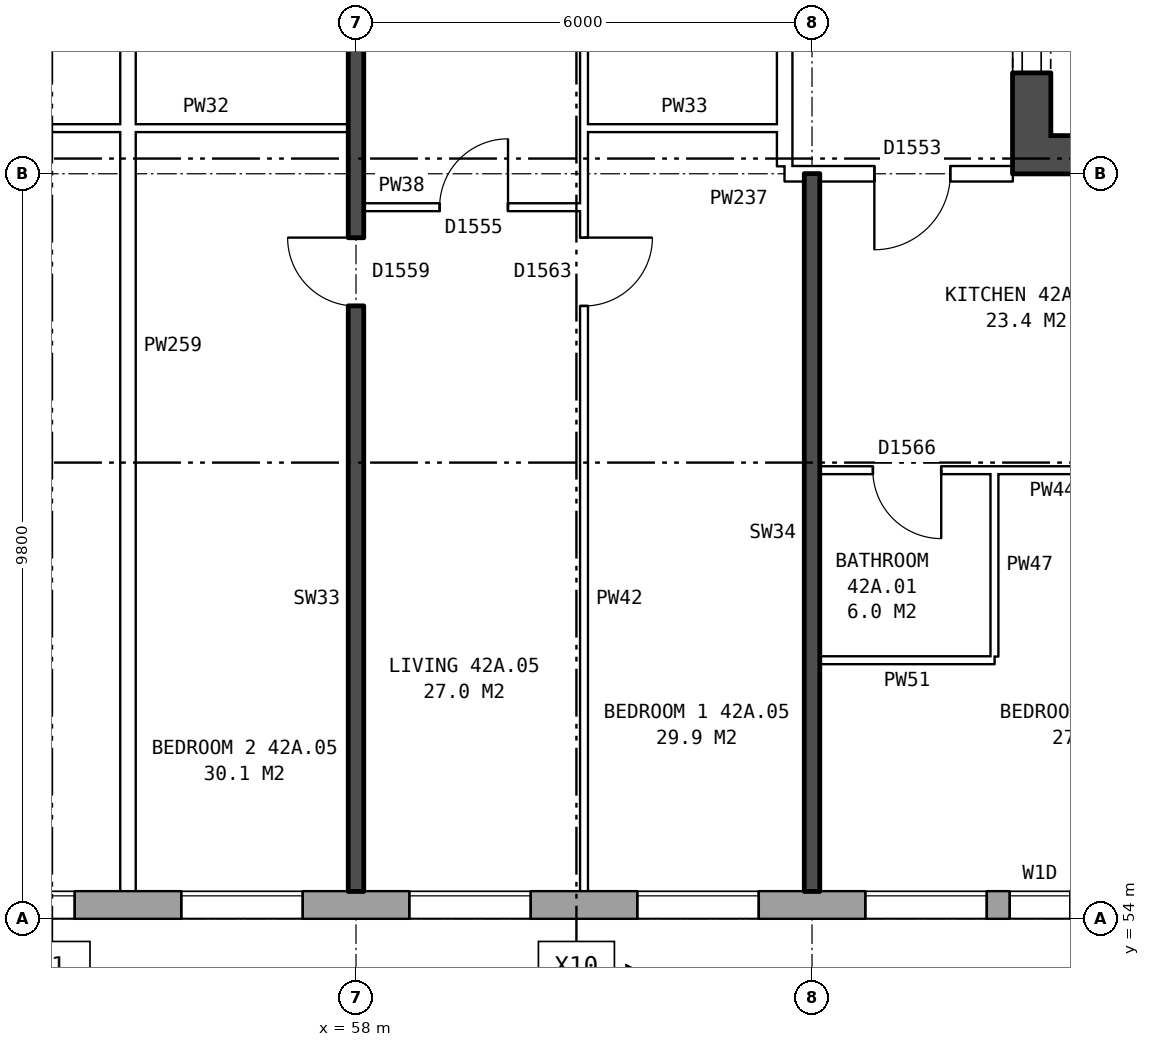
"""IFC4 building model, lengths in metres.
Left out: names, types, materials, properties, quantities, classifications, styles, units other than length and angle.
Written with IfcOpenShell. Run it as: python <this file> out.ifc"""

import sys

from ifc_helpers import new_model, si_unit, direction, frame, frame_2d, origin, place, context, subcontext, project, spatial, rectangle, extrude, element, fill, save


model = new_model("IFC4")
c1 = context("Model", 3, precision=1e-05, world=origin(), true_north=direction((0.0, 1.0)))
c2 = subcontext(c1, "Body", "Model", "MODEL_VIEW")
j1 = project(units=[si_unit("LENGTHUNIT", "METRE"), si_unit("PLANEANGLEUNIT", "RADIAN")], contexts=[c1])
p1 = place(None, origin())
s1 = spatial("IfcSite", under=j1, at=p1, CompositionType="ELEMENT")
p2 = place(p1, origin())
s2 = spatial("IfcBuilding", under=s1, at=p2, CompositionType="ELEMENT")
p3 = place(p2, frame((0.0, 0.0, 151.6)))
s3 = spatial("IfcBuildingStorey", under=s2, at=p3, CompositionType="ELEMENT", Elevation=151.6)
p4 = place(p3, frame((31.575, 54.18, 0.0), z_axis=(0.0, 0.0, 1.0), x_axis=(1.0, 0.0, 0.0)))
e1 = element("IfcWall", 1, at=p4, inside=s3, PredefinedType="STANDARD", context=c2, shape_type="SweptSolid", body=[
    extrude(rectangle(XDim=41.351, YDim=0.36, at=frame_2d((20.675, 0.0))), origin(), (0.0, 0.0, 1.0), 2.85),
])
p5 = place(p4, frame((4.625, 0.0, 0.8)))
e2 = element("IfcOpeningElement", 2, at=p5, cuts=e1, PredefinedType="OPENING", context=c2, shape_type="SweptSolid", body=[
    extrude(rectangle(XDim=1.2, YDim=1.2, at=frame_2d((0.6, 0.6))), frame((0.0, 0.19, 0.0), z_axis=(0.0, -1.0, 0.0), x_axis=(1.0, 0.0, 0.0)), (0.0, 0.0, 1.0), 0.38),
])
p6 = place(p4, frame((6.125, 0.0, 0.8)))
e3 = element("IfcOpeningElement", 3, at=p6, cuts=e1, PredefinedType="OPENING", context=c2, shape_type="SweptSolid", body=[
    extrude(rectangle(XDim=1.6, YDim=1.8, at=frame_2d((0.8, 0.9))), frame((0.0, 0.19, 0.0), z_axis=(0.0, -1.0, 0.0), x_axis=(1.0, 0.0, 0.0)), (0.0, 0.0, 1.0), 0.38),
])
p7 = place(p4, frame((9.125, 0.0, 0.8)))
e4 = element("IfcOpeningElement", 4, at=p7, cuts=e1, PredefinedType="OPENING", context=c2, shape_type="SweptSolid", body=[
    extrude(rectangle(XDim=1.6, YDim=1.8, at=frame_2d((0.8, 0.9))), frame((0.0, 0.19, 0.0), z_axis=(0.0, -1.0, 0.0), x_axis=(1.0, 0.0, 0.0)), (0.0, 0.0, 1.0), 0.38),
])
p8 = place(p4, frame((12.125, 0.0, 0.8)))
e5 = element("IfcOpeningElement", 5, at=p8, cuts=e1, PredefinedType="OPENING", context=c2, shape_type="SweptSolid", body=[
    extrude(rectangle(XDim=1.6, YDim=1.8, at=frame_2d((0.8, 0.9))), frame((0.0, 0.19, 0.0), z_axis=(0.0, -1.0, 0.0), x_axis=(1.0, 0.0, 0.0)), (0.0, 0.0, 1.0), 0.38),
])
p9 = place(p4, frame((15.125, 0.0, 0.8)))
e6 = element("IfcOpeningElement", 6, at=p9, cuts=e1, PredefinedType="OPENING", context=c2, shape_type="SweptSolid", body=[
    extrude(rectangle(XDim=1.6, YDim=1.8, at=frame_2d((0.8, 0.9))), frame((0.0, 0.19, 0.0), z_axis=(0.0, -1.0, 0.0), x_axis=(1.0, 0.0, 0.0)), (0.0, 0.0, 1.0), 0.38),
])
p10 = place(p4, frame((18.125, 0.0, 0.8)))
e7 = element("IfcOpeningElement", 7, at=p10, cuts=e1, PredefinedType="OPENING", context=c2, shape_type="SweptSolid", body=[
    extrude(rectangle(XDim=1.6, YDim=1.8, at=frame_2d((0.8, 0.9))), frame((0.0, 0.19, 0.0), z_axis=(0.0, -1.0, 0.0), x_axis=(1.0, 0.0, 0.0)), (0.0, 0.0, 1.0), 0.38),
])
p11 = place(p4, frame((21.125, 0.0, 0.8)))
e8 = element("IfcOpeningElement", 8, at=p11, cuts=e1, PredefinedType="OPENING", context=c2, shape_type="SweptSolid", body=[
    extrude(rectangle(XDim=1.6, YDim=1.8, at=frame_2d((0.8, 0.9))), frame((0.0, 0.19, 0.0), z_axis=(0.0, -1.0, 0.0), x_axis=(1.0, 0.0, 0.0)), (0.0, 0.0, 1.0), 0.38),
])
p12 = place(p4, frame((24.125, 0.0, 0.8)))
e9 = element("IfcOpeningElement", 9, at=p12, cuts=e1, PredefinedType="OPENING", context=c2, shape_type="SweptSolid", body=[
    extrude(rectangle(XDim=1.6, YDim=1.8, at=frame_2d((0.8, 0.9))), frame((0.0, 0.19, 0.0), z_axis=(0.0, -1.0, 0.0), x_axis=(1.0, 0.0, 0.0)), (0.0, 0.0, 1.0), 0.38),
])
p13 = place(p4, frame((27.125, 0.0, 0.8)))
e10 = element("IfcOpeningElement", 10, at=p13, cuts=e1, PredefinedType="OPENING", context=c2, shape_type="SweptSolid", body=[
    extrude(rectangle(XDim=1.6, YDim=1.8, at=frame_2d((0.8, 0.9))), frame((0.0, 0.19, 0.0), z_axis=(0.0, -1.0, 0.0), x_axis=(1.0, 0.0, 0.0)), (0.0, 0.0, 1.0), 0.38),
])
p14 = place(p4, frame((30.125, 0.0, 0.8)))
e11 = element("IfcOpeningElement", 11, at=p14, cuts=e1, PredefinedType="OPENING", context=c2, shape_type="SweptSolid", body=[
    extrude(rectangle(XDim=1.6, YDim=1.8, at=frame_2d((0.8, 0.9))), frame((0.0, 0.19, 0.0), z_axis=(0.0, -1.0, 0.0), x_axis=(1.0, 0.0, 0.0)), (0.0, 0.0, 1.0), 0.38),
])
p15 = place(p4, frame((33.125, 0.0, 0.8)))
e12 = element("IfcOpeningElement", 12, at=p15, cuts=e1, PredefinedType="OPENING", context=c2, shape_type="SweptSolid", body=[
    extrude(rectangle(XDim=1.6, YDim=1.8, at=frame_2d((0.8, 0.9))), frame((0.0, 0.19, 0.0), z_axis=(0.0, -1.0, 0.0), x_axis=(1.0, 0.0, 0.0)), (0.0, 0.0, 1.0), 0.38),
])
p16 = place(p4, frame((35.025, 0.0, 0.8)))
e13 = element("IfcOpeningElement", 13, at=p16, cuts=e1, PredefinedType="OPENING", context=c2, shape_type="SweptSolid", body=[
    extrude(rectangle(XDim=0.8, YDim=1.8, at=frame_2d((0.4, 0.9))), frame((0.0, 0.19, 0.0), z_axis=(0.0, -1.0, 0.0), x_axis=(1.0, 0.0, 0.0)), (0.0, 0.0, 1.0), 0.38),
])
p17 = place(p4, frame((38.625, 0.0, 1.5)))
e14 = element("IfcOpeningElement", 14, at=p17, cuts=e1, PredefinedType="OPENING", context=c2, shape_type="SweptSolid", body=[
    extrude(rectangle(XDim=0.6, YDim=0.9, at=frame_2d((0.3, 0.45))), frame((0.0, 0.19, 0.0), z_axis=(0.0, -1.0, 0.0), x_axis=(1.0, 0.0, 0.0)), (0.0, 0.0, 1.0), 0.38),
])
p18 = place(p4, frame((36.125, 0.0, 0.8)))
e15 = element("IfcOpeningElement", 15, at=p18, cuts=e1, PredefinedType="OPENING", context=c2, shape_type="SweptSolid", body=[
    extrude(rectangle(XDim=1.0, YDim=0.9, at=frame_2d((0.5, 0.45))), frame((0.0, 0.19, 0.0), z_axis=(0.0, -1.0, 0.0), x_axis=(1.0, 0.0, 0.0)), (0.0, 0.0, 1.0), 0.38),
])
p19 = place(p4, frame((39.525, 0.0, 0.8)))
e16 = element("IfcOpeningElement", 16, at=p19, cuts=e1, PredefinedType="OPENING", context=c2, shape_type="SweptSolid", body=[
    extrude(rectangle(XDim=1.4, YDim=1.8, at=frame_2d((0.7, 0.9))), frame((0.0, 0.19, 0.0), z_axis=(0.0, -1.0, 0.0), x_axis=(1.0, 0.0, 0.0)), (0.0, 0.0, 1.0), 0.38),
])
p20 = place(p3, frame((66.89, 63.8, 0.0), z_axis=(0.0, 0.0, 1.0), x_axis=(0.0, 1.0, 0.0)))
e17 = element("IfcWall", 17, at=p20, inside=s3, PredefinedType="SHEAR", context=c2, shape_type="SweptSolid", body=[
    extrude(rectangle(XDim=12.4, YDim=0.5, at=frame_2d((6.2, 0.0))), origin(), (0.0, 0.0, 1.0), 2.85),
])
p21 = place(p20, frame((1.325, 0.0, 0.0)))
e18 = element("IfcOpeningElement", 18, at=p21, cuts=e17, PredefinedType="OPENING", context=c2, shape_type="SweptSolid", body=[
    extrude(rectangle(XDim=1.1, YDim=2.1, at=frame_2d((0.55, 1.05))), frame((0.0, 0.26, 0.0), z_axis=(0.0, -1.0, 0.0), x_axis=(1.0, 0.0, 0.0)), (0.0, 0.0, 1.0), 0.52),
])
p22 = place(p20, frame((3.6, 0.0, 0.0)))
e19 = element("IfcOpeningElement", 19, at=p22, cuts=e17, PredefinedType="OPENING", context=c2, shape_type="SweptSolid", body=[
    extrude(rectangle(XDim=1.1, YDim=2.1, at=frame_2d((0.55, 1.05))), frame((0.0, 0.26, 0.0), z_axis=(0.0, -1.0, 0.0), x_axis=(1.0, 0.0, 0.0)), (0.0, 0.0, 1.0), 0.52),
])
p23 = place(p20, frame((5.8, 0.0, 0.0)))
e20 = element("IfcOpeningElement", 20, at=p23, cuts=e17, PredefinedType="OPENING", context=c2, shape_type="SweptSolid", body=[
    extrude(rectangle(XDim=1.1, YDim=2.1, at=frame_2d((0.55, 1.05))), frame((0.0, 0.26, 0.0), z_axis=(0.0, -1.0, 0.0), x_axis=(1.0, 0.0, 0.0)), (0.0, 0.0, 1.0), 0.52),
])
p24 = place(p20, frame((8.0, 0.0, 0.0)))
e21 = element("IfcOpeningElement", 21, at=p24, cuts=e17, PredefinedType="OPENING", context=c2, shape_type="SweptSolid", body=[
    extrude(rectangle(XDim=1.1, YDim=2.1, at=frame_2d((0.55, 1.05))), frame((0.0, 0.26, 0.0), z_axis=(0.0, -1.0, 0.0), x_axis=(1.0, 0.0, 0.0)), (0.0, 0.0, 1.0), 0.52),
])
p25 = place(p20, frame((9.9, 0.0, 0.0)))
e22 = element("IfcOpeningElement", 22, at=p25, cuts=e17, PredefinedType="OPENING", context=c2, shape_type="SweptSolid", body=[
    extrude(rectangle(XDim=1.1, YDim=2.1, at=frame_2d((0.55, 1.05))), frame((0.0, 0.26, 0.0), z_axis=(0.0, -1.0, 0.0), x_axis=(1.0, 0.0, 0.0)), (0.0, 0.0, 1.0), 0.52),
])
p26 = place(p3, frame((67.14, 64.05, 0.0), z_axis=(0.0, 0.0, 1.0), x_axis=(1.0, 0.0, 0.0)))
e23 = element("IfcWall", 23, at=p26, inside=s3, PredefinedType="SHEAR", context=c2, shape_type="SweptSolid", body=[
    extrude(rectangle(XDim=8.0, YDim=0.5, at=frame_2d((4.0, 0.0))), origin(), (0.0, 0.0, 1.0), 2.85),
])
p27 = place(p3, frame((63.64, 63.9, 0.0), z_axis=(0.0, 0.0, 1.0), x_axis=(0.0, 1.0, 0.0)))
e24 = element("IfcWall", 24, at=p27, inside=s3, PredefinedType="PARTITIONING", context=c2, shape_type="SweptSolid", body=[
    extrude(rectangle(XDim=12.2, YDim=0.2, at=frame_2d((6.1, 0.0))), origin(), (0.0, 0.0, 1.0), 2.85),
])
p28 = place(p27, frame((5.1, 0.0, 0.0)))
e25 = element("IfcOpeningElement", 25, at=p28, cuts=e24, PredefinedType="OPENING", context=c2, shape_type="SweptSolid", body=[
    extrude(rectangle(XDim=2.0, YDim=2.1, at=frame_2d((1.0, 1.05))), frame((0.0, 0.11, 0.0), z_axis=(0.0, -1.0, 0.0), x_axis=(1.0, 0.0, 0.0)), (0.0, 0.0, 1.0), 0.22),
])
p29 = place(p3, frame((64.1, 57.4, 0.0), z_axis=(0.0, 0.0, 1.0), x_axis=(1.0, 0.0, 0.0)))
e26 = element("IfcWall", 26, at=p29, inside=s3, PredefinedType="PARTITIONING", context=c2, shape_type="SweptSolid", body=[
    extrude(rectangle(XDim=2.3, YDim=0.1, at=frame_2d((1.15, 0.0))), origin(), (0.0, 0.0, 1.0), 2.85),
])
p30 = place(p3, frame((64.1, 59.9, 0.0), z_axis=(0.0, 0.0, 1.0), x_axis=(1.0, 0.0, 0.0)))
e27 = element("IfcWall", 27, at=p30, inside=s3, PredefinedType="PARTITIONING", context=c2, shape_type="SweptSolid", body=[
    extrude(rectangle(XDim=5.8, YDim=0.1, at=frame_2d((2.9, 0.0))), origin(), (0.0, 0.0, 1.0), 2.85),
])
p31 = place(p30, frame((3.6, 0.0, 0.0)))
e28 = element("IfcOpeningElement", 28, at=p31, cuts=e27, PredefinedType="OPENING", context=c2, shape_type="SweptSolid", body=[
    extrude(rectangle(XDim=0.9, YDim=2.1, at=frame_2d((0.45, 1.05))), frame((0.0, 0.06, 0.0), z_axis=(0.0, -1.0, 0.0), x_axis=(1.0, 0.0, 0.0)), (0.0, 0.0, 1.0), 0.12),
])
p32 = place(p30, frame((0.7, 0.0, 0.0)))
e29 = element("IfcOpeningElement", 29, at=p32, cuts=e27, PredefinedType="OPENING", context=c2, shape_type="SweptSolid", body=[
    extrude(rectangle(XDim=0.9, YDim=2.1, at=frame_2d((0.45, 1.05))), frame((0.0, 0.06, 0.0), z_axis=(0.0, -1.0, 0.0), x_axis=(1.0, 0.0, 0.0)), (0.0, 0.0, 1.0), 0.12),
])
p33 = place(p3, frame((58.1, 63.36, 0.0), z_axis=(0.0, 0.0, 1.0), x_axis=(1.0, 0.0, 0.0)))
e30 = element("IfcWall", 30, at=p33, inside=s3, PredefinedType="PARTITIONING", context=c2, shape_type="SweptSolid", body=[
    extrude(rectangle(XDim=2.9, YDim=0.1, at=frame_2d((1.45, 0.0))), origin(), (0.0, 0.0, 1.0), 2.85),
])
p34 = place(p33, frame((1.0, 0.0, 0.0)))
e31 = element("IfcOpeningElement", 31, at=p34, cuts=e30, PredefinedType="OPENING", context=c2, shape_type="SweptSolid", body=[
    extrude(rectangle(XDim=0.9, YDim=2.1, at=frame_2d((0.45, 1.05))), frame((0.0, 0.06, 0.0), z_axis=(0.0, -1.0, 0.0), x_axis=(1.0, 0.0, 0.0)), (0.0, 0.0, 1.0), 0.12),
])
p35 = place(p3, frame((63.64, 63.8, 0.0), z_axis=(0.0, 0.0, 1.0), x_axis=(1.0, 0.0, 0.0)))
e32 = element("IfcWall", 32, at=p35, inside=s3, PredefinedType="PARTITIONING", context=c2, shape_type="SweptSolid", body=[
    extrude(rectangle(XDim=3.0, YDim=0.2, at=frame_2d((1.5, 0.0))), origin(), (0.0, 0.0, 1.0), 2.85),
])
p36 = place(p35, frame((1.18, 0.0, 0.0)))
e33 = element("IfcOpeningElement", 33, at=p36, cuts=e32, PredefinedType="OPENING", context=c2, shape_type="SweptSolid", body=[
    extrude(rectangle(XDim=1.0, YDim=2.1, at=frame_2d((0.5, 1.05))), frame((0.0, 0.11, 0.0), z_axis=(0.0, -1.0, 0.0), x_axis=(1.0, 0.0, 0.0)), (0.0, 0.0, 1.0), 0.22),
])
p37 = place(p3, frame((52.1, 64.4, 0.0), z_axis=(0.0, 0.0, 1.0), x_axis=(1.0, 0.0, 0.0)))
e34 = element("IfcWall", 34, at=p37, inside=s3, PredefinedType="PARTITIONING", context=c2, shape_type="SweptSolid", body=[
    extrude(rectangle(XDim=5.8, YDim=0.1, at=frame_2d((2.9, 0.0))), origin(), (0.0, 0.0, 1.0), 2.85),
])
p38 = place(p3, frame((61.0, 64.4, 0.0), z_axis=(0.0, 0.0, 1.0), x_axis=(1.0, 0.0, 0.0)))
e35 = element("IfcWall", 35, at=p38, inside=s3, PredefinedType="PARTITIONING", context=c2, shape_type="SweptSolid", body=[
    extrude(rectangle(XDim=2.64, YDim=0.1, at=frame_2d((1.32, 0.0))), origin(), (0.0, 0.0, 1.0), 2.85),
])
p39 = place(p3, frame((55.0, 54.36, 0.0), z_axis=(0.0, 0.0, 1.0), x_axis=(0.0, 1.0, 0.0)))
e36 = element("IfcWall", 36, at=p39, inside=s3, PredefinedType="PARTITIONING", context=c2, shape_type="SweptSolid", body=[
    extrude(rectangle(XDim=14.34, YDim=0.2, at=frame_2d((7.17, 0.0))), origin(), (0.0, 0.0, 1.0), 2.85),
])
p40 = place(p3, frame((58.0, 54.36, 0.0), z_axis=(0.0, 0.0, 1.0), x_axis=(0.0, 1.0, 0.0)))
e37 = element("IfcWall", 37, at=p40, inside=s3, PredefinedType="SOLIDWALL", context=c2, shape_type="SweptSolid", body=[
    extrude(rectangle(XDim=14.44, YDim=0.2, at=frame_2d((7.22, 0.0))), origin(), (0.0, 0.0, 1.0), 2.85),
])
p41 = place(p40, frame((7.7, 0.0, 0.0)))
e38 = element("IfcOpeningElement", 38, at=p41, cuts=e37, PredefinedType="OPENING", context=c2, shape_type="SweptSolid", body=[
    extrude(rectangle(XDim=0.9, YDim=2.1, at=frame_2d((0.45, 1.05))), frame((0.0, 0.11, 0.0), z_axis=(0.0, -1.0, 0.0), x_axis=(1.0, 0.0, 0.0)), (0.0, 0.0, 1.0), 0.22),
])
p42 = place(p40, frame((13.14, 0.0, 0.0)))
e39 = element("IfcOpeningElement", 39, at=p42, cuts=e37, PredefinedType="OPENING", context=c2, shape_type="SweptSolid", body=[
    extrude(rectangle(XDim=0.9, YDim=2.1, at=frame_2d((0.45, 1.05))), frame((0.0, 0.11, 0.0), z_axis=(0.0, -1.0, 0.0), x_axis=(1.0, 0.0, 0.0)), (0.0, 0.0, 1.0), 0.22),
])
p43 = place(p3, frame((61.0, 54.36, 0.0), z_axis=(0.0, 0.0, 1.0), x_axis=(0.0, 1.0, 0.0)))
e40 = element("IfcWall", 40, at=p43, inside=s3, PredefinedType="PARTITIONING", context=c2, shape_type="SweptSolid", body=[
    extrude(rectangle(XDim=14.34, YDim=0.1, at=frame_2d((7.17, 0.0))), origin(), (0.0, 0.0, 1.0), 2.85),
])
p44 = place(p43, frame((7.7, 0.0, 0.0)))
e41 = element("IfcOpeningElement", 41, at=p44, cuts=e40, PredefinedType="OPENING", context=c2, shape_type="SweptSolid", body=[
    extrude(rectangle(XDim=0.9, YDim=2.1, at=frame_2d((0.45, 1.05))), frame((0.0, 0.06, 0.0), z_axis=(0.0, -1.0, 0.0), x_axis=(1.0, 0.0, 0.0)), (0.0, 0.0, 1.0), 0.12),
])
p45 = place(p43, frame((13.04, 0.0, 0.0)))
e42 = element("IfcOpeningElement", 42, at=p45, cuts=e40, PredefinedType="OPENING", context=c2, shape_type="SweptSolid", body=[
    extrude(rectangle(XDim=0.9, YDim=2.1, at=frame_2d((0.45, 1.05))), frame((0.0, 0.06, 0.0), z_axis=(0.0, -1.0, 0.0), x_axis=(1.0, 0.0, 0.0)), (0.0, 0.0, 1.0), 0.12),
])
p46 = place(p3, frame((64.0, 54.36, 0.0), z_axis=(0.0, 0.0, 1.0), x_axis=(0.0, 1.0, 0.0)))
e43 = element("IfcWall", 43, at=p46, inside=s3, PredefinedType="SOLIDWALL", context=c2, shape_type="SweptSolid", body=[
    extrude(rectangle(XDim=9.44, YDim=0.2, at=frame_2d((4.72, 0.0))), origin(), (0.0, 0.0, 1.0), 2.85),
])
p47 = place(p3, frame((66.4, 57.45, 0.0), z_axis=(0.0, 0.0, 1.0), x_axis=(0.0, 1.0, 0.0)))
e44 = element("IfcWall", 44, at=p47, inside=s3, PredefinedType="PARTITIONING", context=c2, shape_type="SweptSolid", body=[
    extrude(rectangle(XDim=2.4, YDim=0.1, at=frame_2d((1.2, 0.0))), origin(), (0.0, 0.0, 1.0), 2.85),
])
p48 = place(p11, origin())
e45 = element("IfcWindow", 45, at=p48, inside=s3, PartitioningType="SINGLE_PANEL", PredefinedType="WINDOW", context=c2, shape_type="SweptSolid", body=[
    extrude(rectangle(XDim=1.6, YDim=1.8, at=frame_2d((0.8, 0.9))), frame((0.0, 0.15, 0.0), z_axis=(0.0, -1.0, 0.0), x_axis=(1.0, 0.0, 0.0)), (0.0, 0.0, 1.0), 0.06),
])
fill(e8, e45)
p49 = place(p12, origin())
e46 = element("IfcWindow", 46, at=p49, inside=s3, PartitioningType="SINGLE_PANEL", PredefinedType="WINDOW", context=c2, shape_type="SweptSolid", body=[
    extrude(rectangle(XDim=1.6, YDim=1.8, at=frame_2d((0.8, 0.9))), frame((0.0, 0.15, 0.0), z_axis=(0.0, -1.0, 0.0), x_axis=(1.0, 0.0, 0.0)), (0.0, 0.0, 1.0), 0.06),
])
fill(e9, e46)
p50 = place(p13, origin())
e47 = element("IfcWindow", 47, at=p50, inside=s3, PartitioningType="SINGLE_PANEL", PredefinedType="WINDOW", context=c2, shape_type="SweptSolid", body=[
    extrude(rectangle(XDim=1.6, YDim=1.8, at=frame_2d((0.8, 0.9))), frame((0.0, 0.15, 0.0), z_axis=(0.0, -1.0, 0.0), x_axis=(1.0, 0.0, 0.0)), (0.0, 0.0, 1.0), 0.06),
])
fill(e10, e47)
p51 = place(p14, origin())
e48 = element("IfcWindow", 48, at=p51, inside=s3, PartitioningType="SINGLE_PANEL", PredefinedType="WINDOW", context=c2, shape_type="SweptSolid", body=[
    extrude(rectangle(XDim=1.6, YDim=1.8, at=frame_2d((0.8, 0.9))), frame((0.0, 0.15, 0.0), z_axis=(0.0, -1.0, 0.0), x_axis=(1.0, 0.0, 0.0)), (0.0, 0.0, 1.0), 0.06),
])
fill(e11, e48)
p52 = place(p15, origin())
e49 = element("IfcWindow", 49, at=p52, inside=s3, PartitioningType="SINGLE_PANEL", PredefinedType="WINDOW", context=c2, shape_type="SweptSolid", body=[
    extrude(rectangle(XDim=1.6, YDim=1.8, at=frame_2d((0.8, 0.9))), frame((0.0, 0.15, 0.0), z_axis=(0.0, -1.0, 0.0), x_axis=(1.0, 0.0, 0.0)), (0.0, 0.0, 1.0), 0.06),
])
fill(e12, e49)
p53 = place(p16, origin())
e50 = element("IfcWindow", 50, at=p53, inside=s3, PartitioningType="SINGLE_PANEL", PredefinedType="WINDOW", context=c2, shape_type="SweptSolid", body=[
    extrude(rectangle(XDim=0.8, YDim=1.8, at=frame_2d((0.4, 0.9))), frame((0.0, 0.15, 0.0), z_axis=(0.0, -1.0, 0.0), x_axis=(1.0, 0.0, 0.0)), (0.0, 0.0, 1.0), 0.06),
])
fill(e13, e50)
p54 = place(p21, origin())
e51 = element("IfcDoor", 51, at=p54, inside=s3, OperationType="DOUBLE_DOOR_SLIDING", PredefinedType="DOOR", context=c2, shape_type="SweptSolid", body=[
    extrude(rectangle(XDim=1.1, YDim=2.1, at=frame_2d((0.55, 1.05))), frame((0.0, -0.185, 0.0), z_axis=(0.0, -1.0, 0.0), x_axis=(1.0, 0.0, 0.0)), (0.0, 0.0, 1.0), 0.05),
])
fill(e18, e51)
p55 = place(p36, frame((1.0, 0.0, 0.0), z_axis=(0.0, 0.0, 1.0), x_axis=(-1.0, 0.0, 0.0)))
e52 = element("IfcDoor", 52, at=p55, inside=s3, OperationType="SINGLE_SWING_RIGHT", PredefinedType="DOOR", context=c2, shape_type="SweptSolid", body=[
    extrude(rectangle(XDim=1.0, YDim=2.1, at=frame_2d((0.5, 1.05))), frame((0.0, 0.025, 0.0), z_axis=(0.0, -1.0, 0.0), x_axis=(1.0, 0.0, 0.0)), (0.0, 0.0, 1.0), 0.05),
])
fill(e33, e52)
p56 = place(p32, frame((0.9, 0.0, 0.0), z_axis=(0.0, 0.0, 1.0), x_axis=(-1.0, 0.0, 0.0)))
e53 = element("IfcDoor", 53, at=p56, inside=s3, OperationType="SINGLE_SWING_LEFT", PredefinedType="DOOR", context=c2, shape_type="SweptSolid", body=[
    extrude(rectangle(XDim=0.9, YDim=2.1, at=frame_2d((0.45, 1.05))), frame((0.0, 0.025, 0.0), z_axis=(0.0, -1.0, 0.0), x_axis=(1.0, 0.0, 0.0)), (0.0, 0.0, 1.0), 0.05),
])
fill(e29, e53)
p57 = place(p44, frame((0.9, 0.0, 0.0), z_axis=(0.0, 0.0, 1.0), x_axis=(-1.0, 0.0, 0.0)))
e54 = element("IfcDoor", 54, at=p57, inside=s3, OperationType="SINGLE_SWING_LEFT", PredefinedType="DOOR", context=c2, shape_type="SweptSolid", body=[
    extrude(rectangle(XDim=0.9, YDim=2.1, at=frame_2d((0.45, 1.05))), frame((0.0, 0.025, 0.0), z_axis=(0.0, -1.0, 0.0), x_axis=(1.0, 0.0, 0.0)), (0.0, 0.0, 1.0), 0.05),
])
fill(e41, e54)
p58 = place(p41, origin())
e55 = element("IfcDoor", 55, at=p58, inside=s3, OperationType="SINGLE_SWING_RIGHT", PredefinedType="DOOR", context=c2, shape_type="SweptSolid", body=[
    extrude(rectangle(XDim=0.9, YDim=2.1, at=frame_2d((0.45, 1.05))), frame((0.0, 0.025, 0.0), z_axis=(0.0, -1.0, 0.0), x_axis=(1.0, 0.0, 0.0)), (0.0, 0.0, 1.0), 0.05),
])
fill(e38, e55)
p59 = place(p34, origin())
e56 = element("IfcDoor", 56, at=p59, inside=s3, OperationType="SINGLE_SWING_RIGHT", PredefinedType="DOOR", context=c2, shape_type="SweptSolid", body=[
    extrude(rectangle(XDim=0.9, YDim=2.1, at=frame_2d((0.45, 1.05))), frame((0.0, 0.025, 0.0), z_axis=(0.0, -1.0, 0.0), x_axis=(1.0, 0.0, 0.0)), (0.0, 0.0, 1.0), 0.05),
])
fill(e31, e56)
save(model, sys.argv[1])
